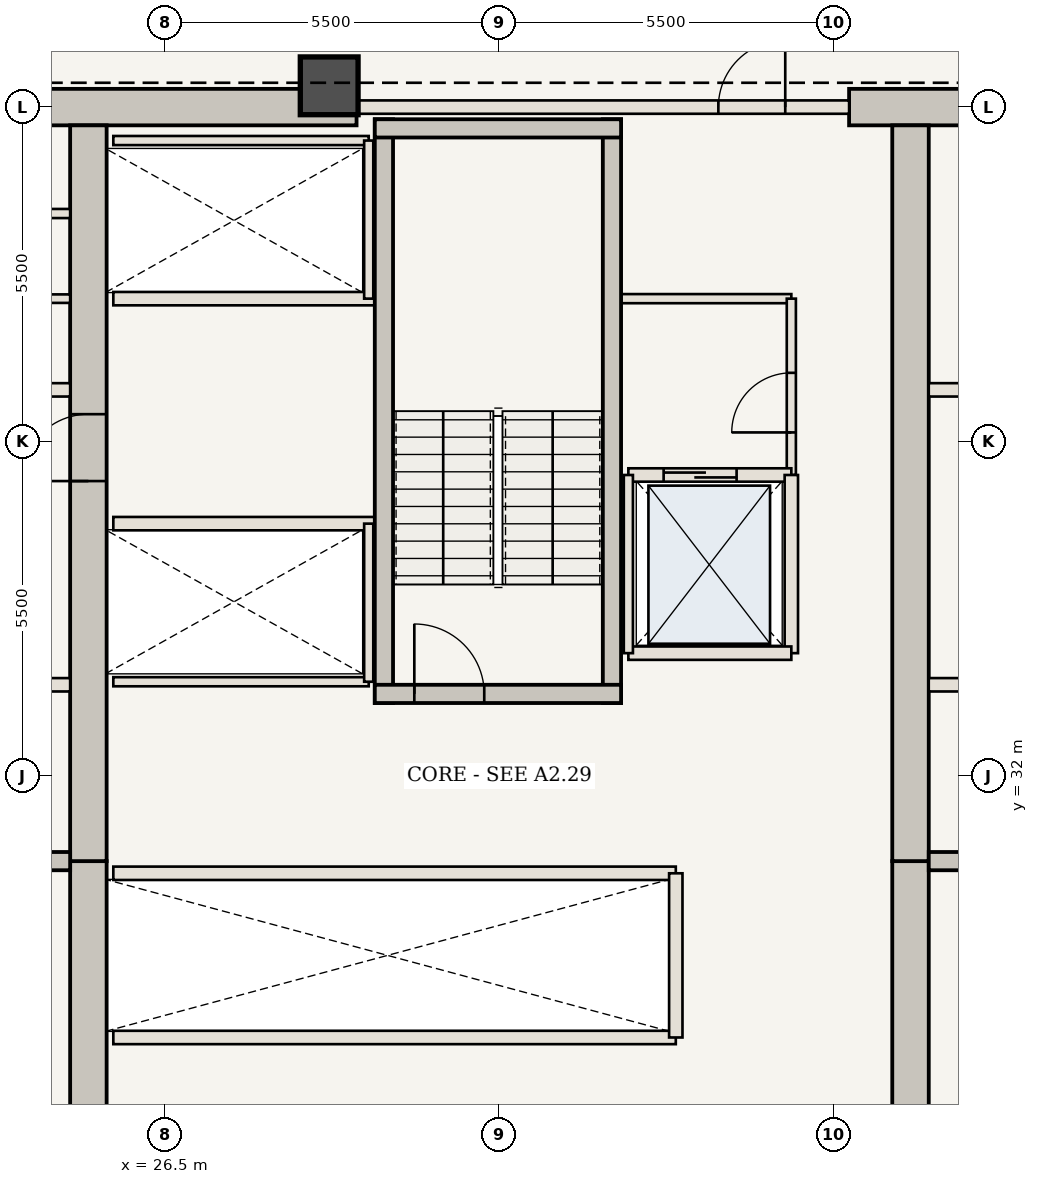
"""IFC4 building model, lengths in metres.
Left out: names, types, materials, properties, quantities, classifications, styles, units other than length and angle.
Written with IfcOpenShell. Run it as: python <this file> out.ifc"""

import sys

from ifc_helpers import new_model, si_unit, direction, frame, frame_2d, origin, origin_2d, place, context, subcontext, project, spatial, rectangle, extrude, element, fill, save


model = new_model("IFC4")
c1 = context("Model", 3, precision=1e-05, world=origin(), true_north=direction((0.0, 1.0)))
c2 = subcontext(c1, "Body", "Model", "MODEL_VIEW")
j1 = project(units=[si_unit("LENGTHUNIT", "METRE"), si_unit("PLANEANGLEUNIT", "RADIAN")], contexts=[c1])
p1 = place(None, origin())
s1 = spatial("IfcSite", under=j1, at=p1, CompositionType="ELEMENT")
p2 = place(p1, origin())
s2 = spatial("IfcBuilding", under=s1, at=p2, CompositionType="ELEMENT")
p3 = place(p2, frame((0.0, 0.0, 122.15)))
s3 = spatial("IfcBuildingStorey", under=s2, at=p3, CompositionType="ELEMENT", Elevation=122.15)
p4 = place(p3, frame((21.41, 43.0, 0.0), z_axis=(0.0, 0.0, 1.0), x_axis=(1.0, 0.0, 0.0)))
e1 = element("IfcWall", 1, at=p4, inside=s3, PredefinedType="SHEAR", context=c2, shape_type="SweptSolid", body=[
    extrude(rectangle(XDim=8.24, YDim=0.6, at=frame_2d((4.12, 0.0))), origin(), (0.0, 0.0, 1.0), 3.85),
])
p5 = place(p3, frame((37.75, 43.0, 0.0), z_axis=(0.0, 0.0, 1.0), x_axis=(1.0, 0.0, 0.0)))
e2 = element("IfcWall", 2, at=p5, inside=s3, PredefinedType="SHEAR", context=c2, shape_type="SweptSolid", body=[
    extrude(rectangle(XDim=4.84, YDim=0.6, at=frame_2d((2.42, 0.0))), origin(), (0.0, 0.0, 1.0), 3.85),
])
p6 = place(p3, frame((25.24, 21.25, 0.0), z_axis=(0.0, 0.0, 1.0), x_axis=(0.0, 1.0, 0.0)))
e3 = element("IfcWall", 3, at=p6, inside=s3, PredefinedType="SHEAR", context=c2, shape_type="SweptSolid", body=[
    extrude(rectangle(XDim=9.35, YDim=0.6, at=frame_2d((4.675, 0.0))), origin(), (0.0, 0.0, 1.0), 3.85),
])
p7 = place(p3, frame((25.24, 30.6, 0.0), z_axis=(0.0, 0.0, 1.0), x_axis=(0.0, 1.0, 0.0)))
e4 = element("IfcWall", 4, at=p7, inside=s3, PredefinedType="SHEAR", context=c2, shape_type="SweptSolid", body=[
    extrude(rectangle(XDim=12.1, YDim=0.6, at=frame_2d((6.05, 0.0))), origin(), (0.0, 0.0, 1.0), 3.85),
])
p8 = place(p7, frame((6.25, 0.0, 0.0)))
e5 = element("IfcOpeningElement", 5, at=p8, cuts=e4, PredefinedType="OPENING", context=c2, shape_type="SweptSolid", body=[
    extrude(rectangle(XDim=1.1, YDim=2.15, at=frame_2d((0.55, 1.075))), frame((0.0, 0.31, 0.0), z_axis=(0.0, -1.0, 0.0), x_axis=(1.0, 0.0, 0.0)), (0.0, 0.0, 1.0), 0.62),
])
p9 = place(p3, frame((38.76, 21.25, 0.0), z_axis=(0.0, 0.0, 1.0), x_axis=(0.0, 1.0, 0.0)))
e6 = element("IfcWall", 6, at=p9, inside=s3, PredefinedType="SHEAR", context=c2, shape_type="SweptSolid", body=[
    extrude(rectangle(XDim=9.35, YDim=0.6, at=frame_2d((4.675, 0.0))), origin(), (0.0, 0.0, 1.0), 3.85),
])
p10 = place(p3, frame((38.76, 30.6, 0.0), z_axis=(0.0, 0.0, 1.0), x_axis=(0.0, 1.0, 0.0)))
e7 = element("IfcWall", 7, at=p10, inside=s3, PredefinedType="SHEAR", context=c2, shape_type="SweptSolid", body=[
    extrude(rectangle(XDim=12.1, YDim=0.6, at=frame_2d((6.05, 0.0))), origin(), (0.0, 0.0, 1.0), 3.85),
])
p11 = place(p3, frame((29.2, 43.35, 0.0), z_axis=(0.0, 0.0, 1.0), x_axis=(1.0, 0.0, 0.0)))
e8 = element("IfcColumn", 8, at=p11, inside=s3, PredefinedType="COLUMN", context=c2, shape_type="SweptSolid", body=[
    extrude(rectangle(XDim=0.95, YDim=0.95, at=origin_2d()), origin(), (0.0, 0.0, 1.0), 3.85),
])
for number, where, z_axis, x_axis in (
    (9, (21.41, 30.6, 0.0), (0.0, 0.0, 1.0), (1.0, 0.0, 0.0)),
    (10, (39.06, 30.6, 0.0), (0.0, 0.0, 1.0), (1.0, 0.0, 0.0)),
):
    element("IfcWall", number, at=place(p3, frame(where, z_axis=z_axis, x_axis=x_axis)), inside=s3, PredefinedType="SHEAR", context=c2, shape_type="SweptSolid", body=[
        extrude(rectangle(XDim=3.53, YDim=0.3, at=frame_2d((1.765, 0.0))), origin(), (0.0, 0.0, 1.0), 3.685),
    ])
p12 = place(p3, frame((21.41, 33.5, 0.0), z_axis=(0.0, 0.0, 1.0), x_axis=(1.0, 0.0, 0.0)))
e11 = element("IfcWall", 11, at=p12, inside=s3, PredefinedType="STANDARD", context=c2, shape_type="SweptSolid", body=[
    extrude(rectangle(XDim=3.53, YDim=0.22, at=frame_2d((1.765, 0.0))), origin(), (0.0, 0.0, 1.0), 3.685),
])
p13 = place(p12, frame((0.75, 0.0, 0.0)))
e12 = element("IfcOpeningElement", 12, at=p13, cuts=e11, PredefinedType="OPENING", context=c2, shape_type="SweptSolid", body=[
    extrude(rectangle(XDim=1.2, YDim=2.2, at=frame_2d((0.6, 1.1))), frame((0.0, 0.12, 0.0), z_axis=(0.0, -1.0, 0.0), x_axis=(1.0, 0.0, 0.0)), (0.0, 0.0, 1.0), 0.24),
])
p14 = place(p3, frame((39.06, 33.5, 0.0), z_axis=(0.0, 0.0, 1.0), x_axis=(1.0, 0.0, 0.0)))
e13 = element("IfcWall", 13, at=p14, inside=s3, PredefinedType="STANDARD", context=c2, shape_type="SweptSolid", body=[
    extrude(rectangle(XDim=3.53, YDim=0.22, at=frame_2d((1.765, 0.0))), origin(), (0.0, 0.0, 1.0), 3.685),
])
p15 = place(p14, frame((1.55, 0.0, 0.0)))
e14 = element("IfcOpeningElement", 14, at=p15, cuts=e13, PredefinedType="OPENING", context=c2, shape_type="SweptSolid", body=[
    extrude(rectangle(XDim=1.2, YDim=2.2, at=frame_2d((0.6, 1.1))), frame((0.0, 0.12, 0.0), z_axis=(0.0, -1.0, 0.0), x_axis=(1.0, 0.0, 0.0)), (0.0, 0.0, 1.0), 0.24),
])
for number, where, z_axis, x_axis in (
    (15, (21.41, 38.35, 0.0), (0.0, 0.0, 1.0), (1.0, 0.0, 0.0)),
    (16, (39.06, 38.35, 0.0), (0.0, 0.0, 1.0), (1.0, 0.0, 0.0)),
):
    element("IfcWall", number, at=place(p3, frame(where, z_axis=z_axis, x_axis=x_axis)), inside=s3, PredefinedType="STANDARD", context=c2, shape_type="SweptSolid", body=[
        extrude(rectangle(XDim=3.53, YDim=0.22, at=frame_2d((1.765, 0.0))), origin(), (0.0, 0.0, 1.0), 3.685),
    ])
p16 = place(p3, frame((21.41, 39.85, 0.0), z_axis=(0.0, 0.0, 1.0), x_axis=(1.0, 0.0, 0.0)))
e17 = element("IfcWall", 17, at=p16, inside=s3, PredefinedType="STANDARD", context=c2, shape_type="SweptSolid", body=[
    extrude(rectangle(XDim=3.53, YDim=0.14, at=frame_2d((1.765, 0.0))), origin(), (0.0, 0.0, 1.0), 3.685),
])
p17 = place(p3, frame((21.41, 41.25, 0.0), z_axis=(0.0, 0.0, 1.0), x_axis=(1.0, 0.0, 0.0)))
e18 = element("IfcWall", 18, at=p17, inside=s3, PredefinedType="STANDARD", context=c2, shape_type="SweptSolid", body=[
    extrude(rectangle(XDim=3.53, YDim=0.15, at=frame_2d((1.765, 0.0))), origin(), (0.0, 0.0, 1.0), 3.685),
])
p18 = place(p3, frame((34.0, 39.85, 0.0), z_axis=(0.0, 0.0, 1.0), x_axis=(1.0, 0.0, 0.0)))
e19 = element("IfcWall", 19, at=p18, inside=s3, PredefinedType="STANDARD", context=c2, shape_type="SweptSolid", body=[
    extrude(rectangle(XDim=2.8, YDim=0.15, at=frame_2d((1.4, 0.0))), origin(), (0.0, 0.0, 1.0), 3.685),
])
p19 = place(p3, frame((36.8, 36.95, 0.0), z_axis=(0.0, 0.0, 1.0), x_axis=(0.0, 1.0, 0.0)))
e20 = element("IfcWall", 20, at=p19, inside=s3, PredefinedType="STANDARD", context=c2, shape_type="SweptSolid", body=[
    extrude(rectangle(XDim=2.9, YDim=0.15, at=frame_2d((1.45, 0.0))), origin(), (0.0, 0.0, 1.0), 3.685),
])
p20 = place(p19, frame((0.7, 0.0, 0.0)))
e21 = element("IfcOpeningElement", 21, at=p20, cuts=e20, PredefinedType="OPENING", context=c2, shape_type="SweptSolid", body=[
    extrude(rectangle(XDim=0.98, YDim=2.2, at=frame_2d((0.49, 1.1))), frame((0.0, 0.085, 0.0), z_axis=(0.0, -1.0, 0.0), x_axis=(1.0, 0.0, 0.0)), (0.0, 0.0, 1.0), 0.17),
])
for number, where, z_axis, x_axis in (
    (22, (25.65, 27.7, 0.0), (0.0, 0.0, 1.0), (1.0, 0.0, 0.0)),
    (23, (25.65, 30.4, 0.0), (0.0, 0.0, 1.0), (1.0, 0.0, 0.0)),
):
    element("IfcWall", number, at=place(p3, frame(where, z_axis=z_axis, x_axis=x_axis)), inside=s3, PredefinedType="STANDARD", context=c2, shape_type="SweptSolid", body=[
        extrude(rectangle(XDim=9.25, YDim=0.22, at=frame_2d((4.625, 0.0))), origin(), (0.0, 0.0, 1.0), 3.685),
    ])
p21 = place(p3, frame((34.9, 27.7, 0.0), z_axis=(0.0, 0.0, 1.0), x_axis=(0.0, 1.0, 0.0)))
e24 = element("IfcWall", 24, at=p21, inside=s3, PredefinedType="STANDARD", context=c2, shape_type="SweptSolid", body=[
    extrude(rectangle(XDim=2.7, YDim=0.22, at=frame_2d((1.35, 0.0))), origin(), (0.0, 0.0, 1.0), 3.685),
])
p22 = place(p3, frame((25.65, 36.15, 0.0), z_axis=(0.0, 0.0, 1.0), x_axis=(1.0, 0.0, 0.0)))
e25 = element("IfcWall", 25, at=p22, inside=s3, PredefinedType="STANDARD", context=c2, shape_type="SweptSolid", body=[
    extrude(rectangle(XDim=4.3, YDim=0.22, at=frame_2d((2.15, 0.0))), origin(), (0.0, 0.0, 1.0), 3.685),
])
p23 = place(p3, frame((25.65, 33.55, 0.0), z_axis=(0.0, 0.0, 1.0), x_axis=(1.0, 0.0, 0.0)))
e26 = element("IfcWall", 26, at=p23, inside=s3, PredefinedType="STANDARD", context=c2, shape_type="SweptSolid", body=[
    extrude(rectangle(XDim=4.2, YDim=0.15, at=frame_2d((2.1, 0.0))), origin(), (0.0, 0.0, 1.0), 3.685),
])
p24 = place(p3, frame((29.85, 33.55, 0.0), z_axis=(0.0, 0.0, 1.0), x_axis=(0.0, 1.0, 0.0)))
e27 = element("IfcWall", 27, at=p24, inside=s3, PredefinedType="STANDARD", context=c2, shape_type="SweptSolid", body=[
    extrude(rectangle(XDim=2.6, YDim=0.15, at=frame_2d((1.3, 0.0))), origin(), (0.0, 0.0, 1.0), 3.685),
])
p25 = place(p3, frame((25.65, 39.85, 0.0), z_axis=(0.0, 0.0, 1.0), x_axis=(1.0, 0.0, 0.0)))
e28 = element("IfcWall", 28, at=p25, inside=s3, PredefinedType="STANDARD", context=c2, shape_type="SweptSolid", body=[
    extrude(rectangle(XDim=4.3, YDim=0.22, at=frame_2d((2.15, 0.0))), origin(), (0.0, 0.0, 1.0), 3.685),
])
p26 = place(p3, frame((25.65, 42.45, 0.0), z_axis=(0.0, 0.0, 1.0), x_axis=(1.0, 0.0, 0.0)))
e29 = element("IfcWall", 29, at=p26, inside=s3, PredefinedType="STANDARD", context=c2, shape_type="SweptSolid", body=[
    extrude(rectangle(XDim=4.2, YDim=0.15, at=frame_2d((2.1, 0.0))), origin(), (0.0, 0.0, 1.0), 3.685),
])
p27 = place(p3, frame((29.85, 39.85, 0.0), z_axis=(0.0, 0.0, 1.0), x_axis=(0.0, 1.0, 0.0)))
e30 = element("IfcWall", 30, at=p27, inside=s3, PredefinedType="STANDARD", context=c2, shape_type="SweptSolid", body=[
    extrude(rectangle(XDim=2.6, YDim=0.15, at=frame_2d((1.3, 0.0))), origin(), (0.0, 0.0, 1.0), 3.685),
])
for number, where, z_axis, x_axis in (
    (31, (30.1, 33.2, 0.0), (0.0, 0.0, 1.0), (0.0, 1.0, 0.0)),
    (32, (33.85, 33.2, 0.0), (0.0, 0.0, 1.0), (0.0, 1.0, 0.0)),
):
    element("IfcWall", number, at=place(p3, frame(where, z_axis=z_axis, x_axis=x_axis)), inside=s3, PredefinedType="SHEAR", context=c2, shape_type="SweptSolid", body=[
        extrude(rectangle(XDim=9.6, YDim=0.3, at=frame_2d((4.8, 0.0))), origin(), (0.0, 0.0, 1.0), 3.685),
    ])
p28 = place(p3, frame((29.95, 33.35, 0.0), z_axis=(0.0, 0.0, 1.0), x_axis=(1.0, 0.0, 0.0)))
e33 = element("IfcWall", 33, at=p28, inside=s3, PredefinedType="SHEAR", context=c2, shape_type="SweptSolid", body=[
    extrude(rectangle(XDim=4.05, YDim=0.3, at=frame_2d((2.025, 0.0))), origin(), (0.0, 0.0, 1.0), 3.685),
])
p29 = place(p28, frame((0.65, 0.0, 0.0)))
e34 = element("IfcOpeningElement", 34, at=p29, cuts=e33, PredefinedType="OPENING", context=c2, shape_type="SweptSolid", body=[
    extrude(rectangle(XDim=1.15, YDim=2.15, at=frame_2d((0.575, 1.075))), frame((0.0, 0.16, 0.0), z_axis=(0.0, -1.0, 0.0), x_axis=(1.0, 0.0, 0.0)), (0.0, 0.0, 1.0), 0.32),
])
p30 = place(p3, frame((29.95, 42.65, 0.0), z_axis=(0.0, 0.0, 1.0), x_axis=(1.0, 0.0, 0.0)))
e35 = element("IfcWall", 35, at=p30, inside=s3, PredefinedType="SHEAR", context=c2, shape_type="SweptSolid", body=[
    extrude(rectangle(XDim=4.05, YDim=0.3, at=frame_2d((2.025, 0.0))), origin(), (0.0, 0.0, 1.0), 3.685),
])
p31 = place(p3, frame((29.65, 43.0, 0.0), z_axis=(0.0, 0.0, 1.0), x_axis=(1.0, 0.0, 0.0)))
e36 = element("IfcWall", 36, at=p31, inside=s3, PredefinedType="STANDARD", context=c2, shape_type="SweptSolid", body=[
    extrude(rectangle(XDim=8.1, YDim=0.22, at=frame_2d((4.05, 0.0))), origin(), (0.0, 0.0, 1.0), 3.685),
])
p32 = place(p31, frame((5.95, 0.0, 0.0)))
e37 = element("IfcOpeningElement", 37, at=p32, cuts=e36, PredefinedType="OPENING", context=c2, shape_type="SweptSolid", body=[
    extrude(rectangle(XDim=1.1, YDim=2.15, at=frame_2d((0.55, 1.075))), frame((0.0, 0.12, 0.0), z_axis=(0.0, -1.0, 0.0), x_axis=(1.0, 0.0, 0.0)), (0.0, 0.0, 1.0), 0.24),
])
p33 = place(p3, frame((34.12, 36.95, 0.0), z_axis=(0.0, 0.0, 1.0), x_axis=(1.0, 0.0, 0.0)))
e38 = element("IfcWall", 38, at=p33, inside=s3, PredefinedType="STANDARD", context=c2, shape_type="SweptSolid", body=[
    extrude(rectangle(XDim=2.68, YDim=0.22, at=frame_2d((1.34, 0.0))), origin(), (0.0, 0.0, 1.0), 3.685),
])
p34 = place(p33, frame((0.58, 0.0, 0.0)))
e39 = element("IfcOpeningElement", 39, at=p34, cuts=e38, PredefinedType="OPENING", context=c2, shape_type="SweptSolid", body=[
    extrude(rectangle(XDim=1.2, YDim=2.2, at=frame_2d((0.6, 1.1))), frame((0.0, 0.12, 0.0), z_axis=(0.0, -1.0, 0.0), x_axis=(1.0, 0.0, 0.0)), (0.0, 0.0, 1.0), 0.24),
])
p35 = place(p3, frame((36.8, 34.02, 0.0), z_axis=(0.0, 0.0, 1.0), x_axis=(0.0, 1.0, 0.0)))
e40 = element("IfcWall", 40, at=p35, inside=s3, PredefinedType="STANDARD", context=c2, shape_type="SweptSolid", body=[
    extrude(rectangle(XDim=2.93, YDim=0.22, at=frame_2d((1.465, 0.0))), origin(), (0.0, 0.0, 1.0), 3.685),
])
p36 = place(p3, frame((34.12, 34.02, 0.0), z_axis=(0.0, 0.0, 1.0), x_axis=(1.0, 0.0, 0.0)))
e41 = element("IfcWall", 41, at=p36, inside=s3, PredefinedType="STANDARD", context=c2, shape_type="SweptSolid", body=[
    extrude(rectangle(XDim=2.68, YDim=0.22, at=frame_2d((1.34, 0.0))), origin(), (0.0, 0.0, 1.0), 3.685),
])
p37 = place(p3, frame((34.12, 34.02, 0.0), z_axis=(0.0, 0.0, 1.0), x_axis=(0.0, 1.0, 0.0)))
e42 = element("IfcWall", 42, at=p37, inside=s3, PredefinedType="STANDARD", context=c2, shape_type="SweptSolid", body=[
    extrude(rectangle(XDim=2.93, YDim=0.15, at=frame_2d((1.465, 0.0))), origin(), (0.0, 0.0, 1.0), 3.685),
])
p38 = place(p8, origin())
e43 = element("IfcDoor", 43, at=p38, inside=s3, OperationType="SINGLE_SWING_LEFT", PredefinedType="DOOR", context=c2, shape_type="SweptSolid", body=[
    extrude(rectangle(XDim=1.1, YDim=2.15, at=frame_2d((0.55, 1.075))), frame((0.0, 0.025, 0.0), z_axis=(0.0, -1.0, 0.0), x_axis=(1.0, 0.0, 0.0)), (0.0, 0.0, 1.0), 0.05),
])
fill(e5, e43)
p39 = place(p20, origin())
e44 = element("IfcDoor", 44, at=p39, inside=s3, OperationType="SINGLE_SWING_LEFT", PredefinedType="DOOR", context=c2, shape_type="SweptSolid", body=[
    extrude(rectangle(XDim=0.98, YDim=2.2, at=frame_2d((0.49, 1.1))), frame((0.0, 0.025, 0.0), z_axis=(0.0, -1.0, 0.0), x_axis=(1.0, 0.0, 0.0)), (0.0, 0.0, 1.0), 0.05),
])
fill(e21, e44)
p40 = place(p29, origin())
e45 = element("IfcDoor", 45, at=p40, inside=s3, OperationType="SINGLE_SWING_LEFT", PredefinedType="DOOR", context=c2, shape_type="SweptSolid", body=[
    extrude(rectangle(XDim=1.15, YDim=2.15, at=frame_2d((0.575, 1.075))), frame((0.0, 0.025, 0.0), z_axis=(0.0, -1.0, 0.0), x_axis=(1.0, 0.0, 0.0)), (0.0, 0.0, 1.0), 0.05),
])
fill(e34, e45)
p41 = place(p32, origin())
e46 = element("IfcDoor", 46, at=p41, inside=s3, OperationType="SINGLE_SWING_RIGHT", PredefinedType="DOOR", context=c2, shape_type="SweptSolid", body=[
    extrude(rectangle(XDim=1.1, YDim=2.15, at=frame_2d((0.55, 1.075))), frame((0.0, 0.025, 0.0), z_axis=(0.0, -1.0, 0.0), x_axis=(1.0, 0.0, 0.0)), (0.0, 0.0, 1.0), 0.05),
])
fill(e37, e46)
p42 = place(p34, origin())
e47 = element("IfcDoor", 47, at=p42, inside=s3, OperationType="DOUBLE_DOOR_SLIDING", PredefinedType="DOOR", context=c2, shape_type="SweptSolid", body=[
    extrude(rectangle(XDim=1.2, YDim=2.2, at=frame_2d((0.6, 1.1))), frame((0.0, 0.025, 0.0), z_axis=(0.0, -1.0, 0.0), x_axis=(1.0, 0.0, 0.0)), (0.0, 0.0, 1.0), 0.05),
])
fill(e39, e47)
save(model, sys.argv[1])
